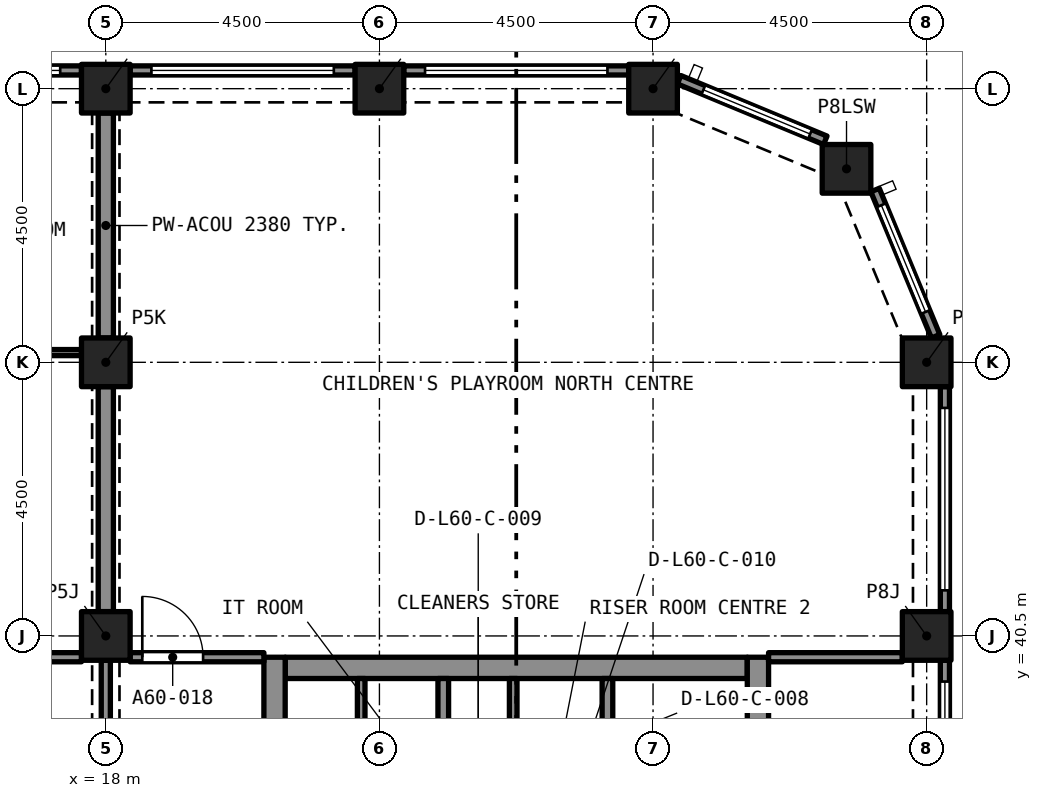
"""IFC4 building model, lengths in metres.
Left out: names, types, materials, properties, quantities, classifications, styles, units other than length and angle.
Written with IfcOpenShell. Run it as: python <this file> out.ifc"""

import sys

from ifc_helpers import new_model, si_unit, direction, frame, frame_2d, origin, origin_2d, place, context, subcontext, project, spatial, rectangle, extrude, element, fill, save


model = new_model("IFC4")
c1 = context("Model", 3, precision=1e-05, world=origin(), true_north=direction((0.0, 1.0)))
c2 = subcontext(c1, "Body", "Model", "MODEL_VIEW")
j1 = project(units=[si_unit("LENGTHUNIT", "METRE"), si_unit("PLANEANGLEUNIT", "RADIAN")], contexts=[c1])
p1 = place(None, origin())
s1 = spatial("IfcSite", under=j1, at=p1, CompositionType="ELEMENT")
p2 = place(p1, origin())
s2 = spatial("IfcBuilding", under=s1, at=p2, CompositionType="ELEMENT")
p3 = place(p2, frame((0.0, 0.0, 216.495)))
s3 = spatial("IfcBuildingStorey", under=s2, at=p3, CompositionType="ELEMENT", Elevation=216.495)
for number, where, z_axis, x_axis in (
    (1, (18.0, 40.5, 0.0), (0.0, 0.0, 1.0), (1.0, 0.0, 0.0)),
    (2, (31.5, 40.5, 0.0), (0.0, 0.0, 1.0), (1.0, 0.0, 0.0)),
    (3, (18.0, 45.0, 0.0), (0.0, 0.0, 1.0), (1.0, 0.0, 0.0)),
    (4, (31.5, 45.0, 0.0), (0.0, 0.0, 1.0), (1.0, 0.0, 0.0)),
    (5, (30.182, 48.182, 0.0), (0.0, 0.0, 1.0), (1.0, 0.0, 0.0)),
    (6, (18.0, 49.5, 0.0), (0.0, 0.0, 1.0), (1.0, 0.0, 0.0)),
    (7, (22.5, 49.5, 0.0), (0.0, 0.0, 1.0), (1.0, 0.0, 0.0)),
    (8, (27.0, 49.5, 0.0), (0.0, 0.0, 1.0), (1.0, 0.0, 0.0)),
):
    element("IfcColumn", number, at=place(p3, frame(where, z_axis=z_axis, x_axis=x_axis)), inside=s3, PredefinedType="COLUMN", context=c2, shape_type="SweptSolid", body=[
        extrude(rectangle(XDim=0.8, YDim=0.8, at=origin_2d()), origin(), (0.0, 0.0, 1.0), 3.2),
    ])
p4 = place(p3, frame((20.95, 39.975, 0.0), z_axis=(0.0, 0.0, 1.0), x_axis=(1.0, 0.0, 0.0)))
e9 = element("IfcWall", 9, at=p4, inside=s3, PredefinedType="SOLIDWALL", context=c2, shape_type="SweptSolid", body=[
    extrude(rectangle(XDim=7.6, YDim=0.35, at=frame_2d((3.8, 0.0))), origin(), (0.0, 0.0, 1.0), 3.2),
])
p5 = place(p3, frame((20.775, 27.35, 0.0), z_axis=(0.0, 0.0, 1.0), x_axis=(0.0, 1.0, 0.0)))
e10 = element("IfcWall", 10, at=p5, inside=s3, PredefinedType="SOLIDWALL", context=c2, shape_type="SweptSolid", body=[
    extrude(rectangle(XDim=12.8, YDim=0.35, at=frame_2d((6.4, 0.0))), origin(), (0.0, 0.0, 1.0), 3.2),
])
p6 = place(p5, frame((8.6, 0.0, 0.0)))
e11 = element("IfcOpeningElement", 11, at=p6, cuts=e10, PredefinedType="OPENING", context=c2, shape_type="SweptSolid", body=[
    extrude(rectangle(XDim=1.2, YDim=2.1, at=frame_2d((0.6, 1.05))), frame((0.0, 0.185, 0.0), z_axis=(0.0, -1.0, 0.0), x_axis=(1.0, 0.0, 0.0)), (0.0, 0.0, 1.0), 0.37),
])
p7 = place(p3, frame((28.725, 27.35, 0.0), z_axis=(0.0, 0.0, 1.0), x_axis=(0.0, 1.0, 0.0)))
e12 = element("IfcWall", 12, at=p7, inside=s3, PredefinedType="SOLIDWALL", context=c2, shape_type="SweptSolid", body=[
    extrude(rectangle(XDim=12.8, YDim=0.35, at=frame_2d((6.4, 0.0))), origin(), (0.0, 0.0, 1.0), 3.2),
])
p8 = place(p7, frame((8.6, 0.0, 0.0)))
e13 = element("IfcOpeningElement", 13, at=p8, cuts=e12, PredefinedType="OPENING", context=c2, shape_type="SweptSolid", body=[
    extrude(rectangle(XDim=1.2, YDim=2.1, at=frame_2d((0.6, 1.05))), frame((0.0, 0.185, 0.0), z_axis=(0.0, -1.0, 0.0), x_axis=(1.0, 0.0, 0.0)), (0.0, 0.0, 1.0), 0.37),
])
p9 = place(p3, frame((31.8, 40.1, 0.0), z_axis=(0.0, 0.0, 1.0), x_axis=(0.0, -1.0, 0.0)))
e14 = element("IfcWall", 14, at=p9, inside=s3, PredefinedType="SOLIDWALL", context=c2, shape_type="SweptSolid", body=[
    extrude(rectangle(XDim=3.7, YDim=0.15, at=frame_2d((1.85, 0.0))), origin(), (0.0, 0.0, 1.0), 3.2),
])
p10 = place(p9, frame((0.35, 0.0, 0.45)))
e15 = element("IfcOpeningElement", 15, at=p10, cuts=e14, PredefinedType="OPENING", context=c2, shape_type="SweptSolid", body=[
    extrude(rectangle(XDim=3.0, YDim=1.95, at=frame_2d((1.5, 0.975))), frame((0.0, 0.085, 0.0), z_axis=(0.0, -1.0, 0.0), x_axis=(1.0, 0.0, 0.0)), (0.0, 0.0, 1.0), 0.17),
])
p11 = place(p3, frame((31.8, 44.6, 0.0), z_axis=(0.0, 0.0, 1.0), x_axis=(0.0, -1.0, 0.0)))
e16 = element("IfcWall", 16, at=p11, inside=s3, PredefinedType="SOLIDWALL", context=c2, shape_type="SweptSolid", body=[
    extrude(rectangle(XDim=3.7, YDim=0.15, at=frame_2d((1.85, 0.0))), origin(), (0.0, 0.0, 1.0), 3.2),
])
p12 = place(p11, frame((0.35, 0.0, 0.45)))
e17 = element("IfcOpeningElement", 17, at=p12, cuts=e16, PredefinedType="OPENING", context=c2, shape_type="SweptSolid", body=[
    extrude(rectangle(XDim=3.0, YDim=1.95, at=frame_2d((1.5, 0.975))), frame((0.0, 0.085, 0.0), z_axis=(0.0, -1.0, 0.0), x_axis=(1.0, 0.0, 0.0)), (0.0, 0.0, 1.0), 0.17),
])
p13 = place(p3, frame((30.651, 47.833, 0.0), z_axis=(0.0, 0.0, 1.0), x_axis=(0.382669406082, -0.923885342263, 0.0)))
e18 = element("IfcWall", 18, at=p13, inside=s3, PredefinedType="SOLIDWALL", context=c2, shape_type="SweptSolid", body=[
    extrude(rectangle(XDim=2.602, YDim=0.15, at=frame_2d((1.301, 0.0))), origin(), (0.0, 0.0, 1.0), 3.2),
])
p14 = place(p13, frame((0.27, 0.0, 0.45)))
e19 = element("IfcOpeningElement", 19, at=p14, cuts=e18, PredefinedType="OPENING", context=c2, shape_type="SweptSolid", body=[
    extrude(rectangle(XDim=1.9, YDim=1.95, at=frame_2d((0.95, 0.975))), frame((0.0, 0.085, 0.0), z_axis=(0.0, -1.0, 0.0), x_axis=(1.0, 0.0, 0.0)), (0.0, 0.0, 1.0), 0.17),
])
p15 = place(p3, frame((27.429, 49.647, 0.0), z_axis=(0.0, 0.0, 1.0), x_axis=(0.923885342263, -0.382669406082, 0.0)))
e20 = element("IfcWall", 20, at=p15, inside=s3, PredefinedType="SOLIDWALL", context=c2, shape_type="SweptSolid", body=[
    extrude(rectangle(XDim=2.602, YDim=0.15, at=frame_2d((1.301, 0.0))), origin(), (0.0, 0.0, 1.0), 3.2),
])
p16 = place(p15, frame((0.432, 0.0, 0.45)))
e21 = element("IfcOpeningElement", 21, at=p16, cuts=e20, PredefinedType="OPENING", context=c2, shape_type="SweptSolid", body=[
    extrude(rectangle(XDim=1.9, YDim=1.95, at=frame_2d((0.95, 0.975))), frame((0.0, 0.085, 0.0), z_axis=(0.0, -1.0, 0.0), x_axis=(1.0, 0.0, 0.0)), (0.0, 0.0, 1.0), 0.17),
])
p17 = place(p3, frame((22.9, 49.8, 0.0), z_axis=(0.0, 0.0, 1.0), x_axis=(1.0, 0.0, 0.0)))
e22 = element("IfcWall", 22, at=p17, inside=s3, PredefinedType="SOLIDWALL", context=c2, shape_type="SweptSolid", body=[
    extrude(rectangle(XDim=3.7, YDim=0.15, at=frame_2d((1.85, 0.0))), origin(), (0.0, 0.0, 1.0), 3.2),
])
p18 = place(p17, frame((0.35, 0.0, 0.45)))
e23 = element("IfcOpeningElement", 23, at=p18, cuts=e22, PredefinedType="OPENING", context=c2, shape_type="SweptSolid", body=[
    extrude(rectangle(XDim=3.0, YDim=1.95, at=frame_2d((1.5, 0.975))), frame((0.0, 0.085, 0.0), z_axis=(0.0, -1.0, 0.0), x_axis=(1.0, 0.0, 0.0)), (0.0, 0.0, 1.0), 0.17),
])
p19 = place(p3, frame((18.4, 49.8, 0.0), z_axis=(0.0, 0.0, 1.0), x_axis=(1.0, 0.0, 0.0)))
e24 = element("IfcWall", 24, at=p19, inside=s3, PredefinedType="SOLIDWALL", context=c2, shape_type="SweptSolid", body=[
    extrude(rectangle(XDim=3.7, YDim=0.15, at=frame_2d((1.85, 0.0))), origin(), (0.0, 0.0, 1.0), 3.2),
])
p20 = place(p19, frame((0.35, 0.0, 0.45)))
e25 = element("IfcOpeningElement", 25, at=p20, cuts=e24, PredefinedType="OPENING", context=c2, shape_type="SweptSolid", body=[
    extrude(rectangle(XDim=3.0, YDim=1.95, at=frame_2d((1.5, 0.975))), frame((0.0, 0.085, 0.0), z_axis=(0.0, -1.0, 0.0), x_axis=(1.0, 0.0, 0.0)), (0.0, 0.0, 1.0), 0.17),
])
p21 = place(p3, frame((13.9, 49.8, 0.0), z_axis=(0.0, 0.0, 1.0), x_axis=(1.0, 0.0, 0.0)))
e26 = element("IfcWall", 26, at=p21, inside=s3, PredefinedType="SOLIDWALL", context=c2, shape_type="SweptSolid", body=[
    extrude(rectangle(XDim=3.7, YDim=0.15, at=frame_2d((1.85, 0.0))), origin(), (0.0, 0.0, 1.0), 3.2),
])
p22 = place(p21, frame((0.35, 0.0, 0.45)))
e27 = element("IfcOpeningElement", 27, at=p22, cuts=e26, PredefinedType="OPENING", context=c2, shape_type="SweptSolid", body=[
    extrude(rectangle(XDim=3.0, YDim=1.95, at=frame_2d((1.5, 0.975))), frame((0.0, 0.085, 0.0), z_axis=(0.0, -1.0, 0.0), x_axis=(1.0, 0.0, 0.0)), (0.0, 0.0, 1.0), 0.17),
])
p23 = place(p3, frame((13.5, 45.16, 0.0), z_axis=(0.0, 0.0, 1.0), x_axis=(1.0, 0.0, 0.0)))
e28 = element("IfcWall", 28, at=p23, inside=s3, PredefinedType="PARTITIONING", context=c2, shape_type="SweptSolid", body=[
    extrude(rectangle(XDim=4.1, YDim=0.1, at=frame_2d((2.05, 0.0))), origin(), (0.0, 0.0, 1.0), 2.9),
])
p24 = place(p23, frame((1.8, 0.0, 0.0)))
e29 = element("IfcOpeningElement", 29, at=p24, cuts=e28, PredefinedType="OPENING", context=c2, shape_type="SweptSolid", body=[
    extrude(rectangle(XDim=0.9, YDim=2.1, at=frame_2d((0.45, 1.05))), frame((0.0, 0.06, 0.0), z_axis=(0.0, -1.0, 0.0), x_axis=(1.0, 0.0, 0.0)), (0.0, 0.0, 1.0), 0.12),
])
for number, where, z_axis, x_axis in (
    (30, (18.0, 45.4, 0.0), (0.0, 0.0, 1.0), (0.0, 1.0, 0.0)),
    (31, (18.0, 40.9, 0.0), (0.0, 0.0, 1.0), (0.0, 1.0, 0.0)),
):
    element("IfcWall", number, at=place(p3, frame(where, z_axis=z_axis, x_axis=x_axis)), inside=s3, PredefinedType="PARTITIONING", context=c2, shape_type="SweptSolid", body=[
        extrude(rectangle(XDim=3.7, YDim=0.25, at=frame_2d((1.85, 0.0))), origin(), (0.0, 0.0, 1.0), 2.38),
    ])
p25 = place(p3, frame((14.95, 40.15, 0.0), z_axis=(0.0, 0.0, 1.0), x_axis=(1.0, 0.0, 0.0)))
e32 = element("IfcWall", 32, at=p25, inside=s3, PredefinedType="PARTITIONING", context=c2, shape_type="SweptSolid", body=[
    extrude(rectangle(XDim=2.65, YDim=0.15, at=frame_2d((1.325, 0.0))), origin(), (0.0, 0.0, 1.0), 2.9),
])
p26 = place(p25, frame((0.2, 0.0, 0.0)))
e33 = element("IfcOpeningElement", 33, at=p26, cuts=e32, PredefinedType="OPENING", context=c2, shape_type="SweptSolid", body=[
    extrude(rectangle(XDim=1.2, YDim=2.4, at=frame_2d((0.6, 1.2))), frame((0.0, 0.085, 0.0), z_axis=(0.0, -1.0, 0.0), x_axis=(1.0, 0.0, 0.0)), (0.0, 0.0, 1.0), 0.17),
])
p27 = place(p3, frame((18.4, 40.15, 0.0), z_axis=(0.0, 0.0, 1.0), x_axis=(1.0, 0.0, 0.0)))
e34 = element("IfcWall", 34, at=p27, inside=s3, PredefinedType="PARTITIONING", context=c2, shape_type="SweptSolid", body=[
    extrude(rectangle(XDim=2.2, YDim=0.15, at=frame_2d((1.1, 0.0))), origin(), (0.0, 0.0, 1.0), 2.75),
])
p28 = place(p27, frame((0.2, 0.0, 0.0)))
e35 = element("IfcOpeningElement", 35, at=p28, cuts=e34, PredefinedType="OPENING", context=c2, shape_type="SweptSolid", body=[
    extrude(rectangle(XDim=1.0, YDim=2.1, at=frame_2d((0.5, 1.05))), frame((0.0, 0.085, 0.0), z_axis=(0.0, -1.0, 0.0), x_axis=(1.0, 0.0, 0.0)), (0.0, 0.0, 1.0), 0.17),
])
p29 = place(p3, frame((28.9, 40.15, 0.0), z_axis=(0.0, 0.0, 1.0), x_axis=(1.0, 0.0, 0.0)))
e36 = element("IfcWall", 36, at=p29, inside=s3, PredefinedType="PARTITIONING", context=c2, shape_type="SweptSolid", body=[
    extrude(rectangle(XDim=2.2, YDim=0.15, at=frame_2d((1.1, 0.0))), origin(), (0.0, 0.0, 1.0), 2.75),
])
p30 = place(p3, frame((18.0, 40.1, 0.0), z_axis=(0.0, 0.0, 1.0), x_axis=(0.0, -1.0, 0.0)))
e37 = element("IfcWall", 37, at=p30, inside=s3, PredefinedType="PARTITIONING", context=c2, shape_type="SweptSolid", body=[
    extrude(rectangle(XDim=3.7, YDim=0.15, at=frame_2d((1.85, 0.0))), origin(), (0.0, 0.0, 1.0), 2.38),
])
p31 = place(p30, frame((1.25, 0.0, 0.0)))
e38 = element("IfcOpeningElement", 38, at=p31, cuts=e37, PredefinedType="OPENING", context=c2, shape_type="SweptSolid", body=[
    extrude(rectangle(XDim=1.2, YDim=2.1, at=frame_2d((0.6, 1.05))), frame((0.0, 0.085, 0.0), z_axis=(0.0, -1.0, 0.0), x_axis=(1.0, 0.0, 0.0)), (0.0, 0.0, 1.0), 0.17),
])
for number, where, z_axis, x_axis in (
    (39, (23.55, 37.5, 0.0), (0.0, 0.0, 1.0), (0.0, 1.0, 0.0)),
    (40, (26.25, 37.5, 0.0), (0.0, 0.0, 1.0), (0.0, 1.0, 0.0)),
):
    element("IfcWall", number, at=place(p3, frame(where, z_axis=z_axis, x_axis=x_axis)), inside=s3, PredefinedType="SOLIDWALL", context=c2, shape_type="SweptSolid", body=[
        extrude(rectangle(XDim=2.3, YDim=0.175, at=frame_2d((1.15, 0.0))), origin(), (0.0, 0.0, 1.0), 2.9),
    ])
for number, where, z_axis, x_axis in (
    (41, (22.2, 37.5, 0.0), (0.0, 0.0, 1.0), (0.0, 1.0, 0.0)),
    (42, (24.7, 37.5, 0.0), (0.0, 0.0, 1.0), (0.0, 1.0, 0.0)),
):
    element("IfcWall", number, at=place(p3, frame(where, z_axis=z_axis, x_axis=x_axis)), inside=s3, PredefinedType="PARTITIONING", context=c2, shape_type="SweptSolid", body=[
        extrude(rectangle(XDim=2.3, YDim=0.125, at=frame_2d((1.15, 0.0))), origin(), (0.0, 0.0, 1.0), 2.9),
    ])
p32 = place(p10, origin())
e43 = element("IfcWindow", 43, at=p32, inside=s3, PartitioningType="SINGLE_PANEL", PredefinedType="WINDOW", context=c2, shape_type="SweptSolid", body=[
    extrude(rectangle(XDim=3.0, YDim=1.95, at=frame_2d((1.5, 0.975))), frame((0.0, 0.03, 0.0), z_axis=(0.0, -1.0, 0.0), x_axis=(1.0, 0.0, 0.0)), (0.0, 0.0, 1.0), 0.06),
])
fill(e15, e43)
p33 = place(p12, origin())
e44 = element("IfcWindow", 44, at=p33, inside=s3, PartitioningType="SINGLE_PANEL", PredefinedType="WINDOW", context=c2, shape_type="SweptSolid", body=[
    extrude(rectangle(XDim=3.0, YDim=1.95, at=frame_2d((1.5, 0.975))), frame((0.0, 0.03, 0.0), z_axis=(0.0, -1.0, 0.0), x_axis=(1.0, 0.0, 0.0)), (0.0, 0.0, 1.0), 0.06),
])
fill(e17, e44)
p34 = place(p14, origin())
e45 = element("IfcWindow", 45, at=p34, inside=s3, PartitioningType="SINGLE_PANEL", PredefinedType="WINDOW", context=c2, shape_type="SweptSolid", body=[
    extrude(rectangle(XDim=1.9, YDim=1.95, at=frame_2d((0.95, 0.975))), frame((0.0, 0.03, 0.0), z_axis=(0.0, -1.0, 0.0), x_axis=(1.0, 0.0, 0.0)), (0.0, 0.0, 1.0), 0.06),
])
fill(e19, e45)
p35 = place(p16, origin())
e46 = element("IfcWindow", 46, at=p35, inside=s3, PartitioningType="SINGLE_PANEL", PredefinedType="WINDOW", context=c2, shape_type="SweptSolid", body=[
    extrude(rectangle(XDim=1.9, YDim=1.95, at=frame_2d((0.95, 0.975))), frame((0.0, 0.03, 0.0), z_axis=(0.0, -1.0, 0.0), x_axis=(1.0, 0.0, 0.0)), (0.0, 0.0, 1.0), 0.06),
])
fill(e21, e46)
p36 = place(p18, origin())
e47 = element("IfcWindow", 47, at=p36, inside=s3, PartitioningType="SINGLE_PANEL", PredefinedType="WINDOW", context=c2, shape_type="SweptSolid", body=[
    extrude(rectangle(XDim=3.0, YDim=1.95, at=frame_2d((1.5, 0.975))), frame((0.0, 0.03, 0.0), z_axis=(0.0, -1.0, 0.0), x_axis=(1.0, 0.0, 0.0)), (0.0, 0.0, 1.0), 0.06),
])
fill(e23, e47)
p37 = place(p20, origin())
e48 = element("IfcWindow", 48, at=p37, inside=s3, PartitioningType="SINGLE_PANEL", PredefinedType="WINDOW", context=c2, shape_type="SweptSolid", body=[
    extrude(rectangle(XDim=3.0, YDim=1.95, at=frame_2d((1.5, 0.975))), frame((0.0, 0.03, 0.0), z_axis=(0.0, -1.0, 0.0), x_axis=(1.0, 0.0, 0.0)), (0.0, 0.0, 1.0), 0.06),
])
fill(e25, e48)
p38 = place(p22, origin())
e49 = element("IfcWindow", 49, at=p38, inside=s3, PartitioningType="SINGLE_PANEL", PredefinedType="WINDOW", context=c2, shape_type="SweptSolid", body=[
    extrude(rectangle(XDim=3.0, YDim=1.95, at=frame_2d((1.5, 0.975))), frame((0.0, 0.03, 0.0), z_axis=(0.0, -1.0, 0.0), x_axis=(1.0, 0.0, 0.0)), (0.0, 0.0, 1.0), 0.06),
])
fill(e27, e49)
p39 = place(p28, origin())
e50 = element("IfcDoor", 50, at=p39, inside=s3, OperationType="SINGLE_SWING_LEFT", PredefinedType="DOOR", context=c2, shape_type="SweptSolid", body=[
    extrude(rectangle(XDim=1.0, YDim=2.1, at=frame_2d((0.5, 1.05))), frame((0.0, 0.025, 0.0), z_axis=(0.0, -1.0, 0.0), x_axis=(1.0, 0.0, 0.0)), (0.0, 0.0, 1.0), 0.05),
])
fill(e35, e50)
save(model, sys.argv[1])
